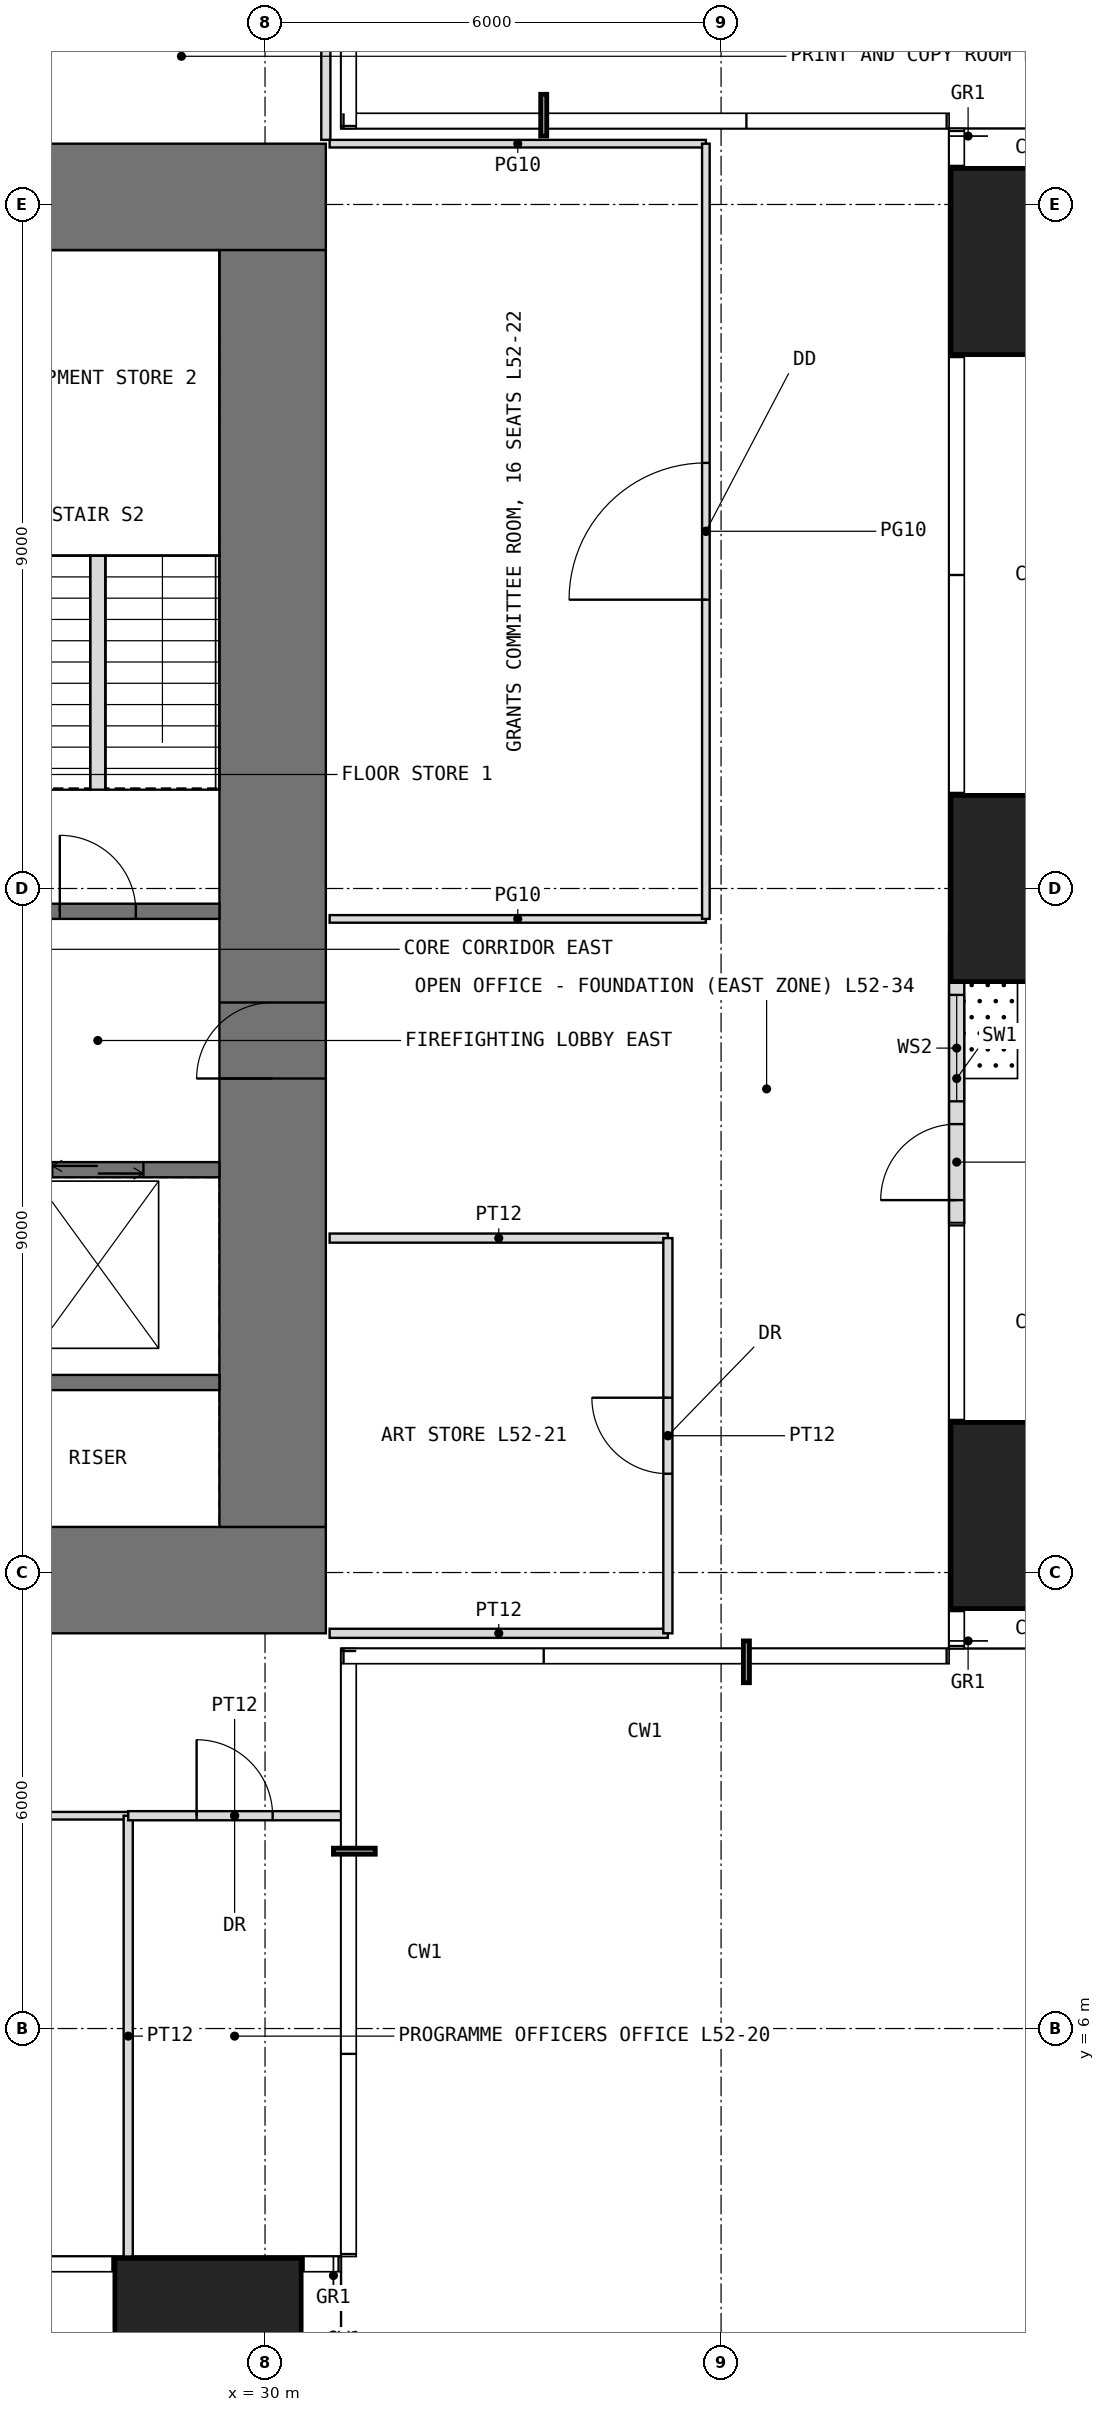
"""IFC4 building model, lengths in metres.
Left out: names, types, materials, properties, quantities, classifications, styles, units other than length and angle.
Written with IfcOpenShell. Run it as: python <this file> out.ifc"""

import sys

from ifc_helpers import new_model, si_unit, direction, frame, frame_2d, origin, origin_2d, place, context, subcontext, project, spatial, rectangle, extrude, element, fill, save


model = new_model("IFC4")
c1 = context("Model", 3, precision=1e-05, world=origin(), true_north=direction((0.0, 1.0)))
c2 = subcontext(c1, "Body", "Model", "MODEL_VIEW")
j1 = project(units=[si_unit("LENGTHUNIT", "METRE"), si_unit("PLANEANGLEUNIT", "RADIAN")], contexts=[c1])
p1 = place(None, origin())
s1 = spatial("IfcSite", under=j1, at=p1, CompositionType="ELEMENT")
p2 = place(p1, origin())
s2 = spatial("IfcBuilding", under=s1, at=p2, CompositionType="ELEMENT")
p3 = place(p2, frame((0.0, 0.0, 218.5)))
s3 = spatial("IfcBuildingStorey", under=s2, at=p3, CompositionType="ELEMENT", Elevation=218.5)
for number, where, z_axis, x_axis in (
    (1, (29.25, 1.75, 0.0), (0.0, 0.0, 1.0), (1.0, 0.0, 0.0)),
    (2, (40.25, 12.75, 0.0), (0.0, 0.0, 1.0), (1.0, 0.0, 0.0)),
    (3, (40.25, 21.0, 0.0), (0.0, 0.0, 1.0), (1.0, 0.0, 0.0)),
    (4, (40.25, 29.25, 0.0), (0.0, 0.0, 1.0), (1.0, 0.0, 0.0)),
):
    element("IfcColumn", number, at=place(p3, frame(where, z_axis=z_axis, x_axis=x_axis)), inside=s3, PredefinedType="COLUMN", context=c2, shape_type="SweptSolid", body=[
        extrude(rectangle(XDim=2.45, YDim=2.45, at=origin_2d()), origin(), (0.0, 0.0, 1.0), 4.0),
    ])
p4 = place(p3, frame((39.1, 16.6, 0.0), z_axis=(0.0, 0.0, 1.0), x_axis=(0.0, 1.0, 0.0)))
e5 = element("IfcWall", 5, at=p4, inside=s3, PredefinedType="USERDEFINED", context=c2, shape_type="SweptSolid", body=[
    extrude(rectangle(XDim=3.8, YDim=0.2, at=frame_2d((1.9, 0.0))), origin(), (0.0, 0.0, 1.0), 3.75),
])
p5 = place(p4, frame((0.3, 0.0, 0.0)))
e6 = element("IfcOpeningElement", 6, at=p5, cuts=e5, PredefinedType="OPENING", context=c2, shape_type="SweptSolid", body=[
    extrude(rectangle(XDim=1.0, YDim=2.4, at=frame_2d((0.5, 1.2))), frame((0.0, 0.11, 0.0), z_axis=(0.0, -1.0, 0.0), x_axis=(1.0, 0.0, 0.0)), (0.0, 0.0, 1.0), 0.22),
])
p6 = place(p4, frame((1.6, 0.0, 0.3)))
e7 = element("IfcOpeningElement", 7, at=p6, cuts=e5, PredefinedType="OPENING", context=c2, shape_type="SweptSolid", body=[
    extrude(rectangle(XDim=1.4, YDim=2.7, at=frame_2d((0.7, 1.35))), frame((0.0, 0.11, 0.0), z_axis=(0.0, -1.0, 0.0), x_axis=(1.0, 0.0, 0.0)), (0.0, 0.0, 1.0), 0.22),
])
p7 = place(p3, frame((11.2, 11.9, -0.05), z_axis=(0.0, 0.0, 1.0), x_axis=(1.0, 0.0, 0.0)))
e8 = element("IfcWall", 8, at=p7, inside=s3, PredefinedType="SHEAR", context=c2, shape_type="SweptSolid", body=[
    extrude(rectangle(XDim=19.6, YDim=1.4, at=frame_2d((9.8, 0.0))), origin(), (0.0, 0.0, 1.0), 4.0),
])
p8 = place(p7, frame((8.8, 0.0, 0.05)))
e9 = element("IfcOpeningElement", 9, at=p8, cuts=e8, PredefinedType="OPENING", context=c2, shape_type="SweptSolid", body=[
    extrude(rectangle(XDim=2.0, YDim=2.2, at=frame_2d((1.0, 1.1))), frame((0.0, 0.71, 0.0), z_axis=(0.0, -1.0, 0.0), x_axis=(1.0, 0.0, 0.0)), (0.0, 0.0, 1.0), 1.42),
])
p9 = place(p3, frame((11.2, 30.1, -0.05), z_axis=(0.0, 0.0, 1.0), x_axis=(1.0, 0.0, 0.0)))
e10 = element("IfcWall", 10, at=p9, inside=s3, PredefinedType="SHEAR", context=c2, shape_type="SweptSolid", body=[
    extrude(rectangle(XDim=19.6, YDim=1.4, at=frame_2d((9.8, 0.0))), origin(), (0.0, 0.0, 1.0), 4.0),
])
p10 = place(p9, frame((8.8, 0.0, 0.05)))
e11 = element("IfcOpeningElement", 11, at=p10, cuts=e10, PredefinedType="OPENING", context=c2, shape_type="SweptSolid", body=[
    extrude(rectangle(XDim=2.0, YDim=2.2, at=frame_2d((1.0, 1.1))), frame((0.0, 0.71, 0.0), z_axis=(0.0, -1.0, 0.0), x_axis=(1.0, 0.0, 0.0)), (0.0, 0.0, 1.0), 1.42),
])
p11 = place(p3, frame((30.1, 12.6, -0.05), z_axis=(0.0, 0.0, 1.0), x_axis=(0.0, 1.0, 0.0)))
e12 = element("IfcWall", 12, at=p11, inside=s3, PredefinedType="SHEAR", context=c2, shape_type="SweptSolid", body=[
    extrude(rectangle(XDim=16.8, YDim=1.4, at=frame_2d((8.4, 0.0))), origin(), (0.0, 0.0, 1.0), 4.0),
])
p12 = place(p11, frame((5.9, 0.0, 0.05)))
e13 = element("IfcOpeningElement", 13, at=p12, cuts=e12, PredefinedType="OPENING", context=c2, shape_type="SweptSolid", body=[
    extrude(rectangle(XDim=1.0, YDim=2.2, at=frame_2d((0.5, 1.1))), frame((0.0, 0.71, 0.0), z_axis=(0.0, -1.0, 0.0), x_axis=(1.0, 0.0, 0.0)), (0.0, 0.0, 1.0), 1.42),
])
p13 = place(p3, frame((26.2, 14.5, -0.05), z_axis=(0.0, 0.0, 1.0), x_axis=(1.0, 0.0, 0.0)))
e14 = element("IfcWall", 14, at=p13, inside=s3, PredefinedType="SHEAR", context=c2, shape_type="SweptSolid", body=[
    extrude(rectangle(XDim=3.2, YDim=0.2, at=frame_2d((1.6, 0.0))), origin(), (0.0, 0.0, 1.0), 4.0),
])
p14 = place(p3, frame((26.2, 17.3, -0.05), z_axis=(0.0, 0.0, 1.0), x_axis=(1.0, 0.0, 0.0)))
e15 = element("IfcWall", 15, at=p14, inside=s3, PredefinedType="SHEAR", context=c2, shape_type="SweptSolid", body=[
    extrude(rectangle(XDim=3.2, YDim=0.2, at=frame_2d((1.6, 0.0))), origin(), (0.0, 0.0, 1.0), 4.0),
])
p15 = place(p14, frame((1.0, 0.0, 0.05)))
e16 = element("IfcOpeningElement", 16, at=p15, cuts=e15, PredefinedType="OPENING", context=c2, shape_type="SweptSolid", body=[
    extrude(rectangle(XDim=1.2, YDim=2.2, at=frame_2d((0.6, 1.1))), frame((0.0, 0.11, 0.0), z_axis=(0.0, -1.0, 0.0), x_axis=(1.0, 0.0, 0.0)), (0.0, 0.0, 1.0), 0.22),
])
p16 = place(p3, frame((26.2, 20.7, -0.05), z_axis=(0.0, 0.0, 1.0), x_axis=(1.0, 0.0, 0.0)))
e17 = element("IfcWall", 17, at=p16, inside=s3, PredefinedType="SHEAR", context=c2, shape_type="SweptSolid", body=[
    extrude(rectangle(XDim=3.2, YDim=0.2, at=frame_2d((1.6, 0.0))), origin(), (0.0, 0.0, 1.0), 4.0),
])
p17 = place(p16, frame((1.1, 0.0, 0.05)))
e18 = element("IfcOpeningElement", 18, at=p17, cuts=e17, PredefinedType="OPENING", context=c2, shape_type="SweptSolid", body=[
    extrude(rectangle(XDim=1.0, YDim=2.2, at=frame_2d((0.5, 1.1))), frame((0.0, 0.11, 0.0), z_axis=(0.0, -1.0, 0.0), x_axis=(1.0, 0.0, 0.0)), (0.0, 0.0, 1.0), 0.22),
])
p18 = place(p3, frame((18.95, 8.8, 0.0), z_axis=(0.0, 0.0, 1.0), x_axis=(1.0, 0.0, 0.0)))
e19 = element("IfcWall", 19, at=p18, inside=s3, PredefinedType="PARTITIONING", context=c2, shape_type="SweptSolid", body=[
    extrude(rectangle(XDim=9.25, YDim=0.1, at=frame_2d((4.625, 0.0))), origin(), (0.0, 0.0, 1.0), 3.75),
])
p19 = place(p18, frame((4.125, 0.0, 0.0)))
e20 = element("IfcOpeningElement", 20, at=p19, cuts=e19, PredefinedType="OPENING", context=c2, shape_type="SweptSolid", body=[
    extrude(rectangle(XDim=1.0, YDim=2.4, at=frame_2d((0.5, 1.2))), frame((0.0, 0.06, 0.0), z_axis=(0.0, -1.0, 0.0), x_axis=(1.0, 0.0, 0.0)), (0.0, 0.0, 1.0), 0.12),
])
p20 = place(p3, frame((28.2, 3.0, 0.0), z_axis=(0.0, 0.0, 1.0), x_axis=(0.0, 1.0, 0.0)))
e21 = element("IfcWall", 21, at=p20, inside=s3, PredefinedType="PARTITIONING", context=c2, shape_type="SweptSolid", body=[
    extrude(rectangle(XDim=5.8, YDim=0.12, at=frame_2d((2.9, 0.0))), origin(), (0.0, 0.0, 1.0), 3.75),
])
p21 = place(p3, frame((28.2, 8.8, 0.0), z_axis=(0.0, 0.0, 1.0), x_axis=(1.0, 0.0, 0.0)))
e22 = element("IfcWall", 22, at=p21, inside=s3, PredefinedType="PARTITIONING", context=c2, shape_type="SweptSolid", body=[
    extrude(rectangle(XDim=2.8, YDim=0.12, at=frame_2d((1.4, 0.0))), origin(), (0.0, 0.0, 1.0), 3.75),
])
p22 = place(p21, frame((0.9, 0.0, 0.0)))
e23 = element("IfcOpeningElement", 23, at=p22, cuts=e22, PredefinedType="OPENING", context=c2, shape_type="SweptSolid", body=[
    extrude(rectangle(XDim=1.0, YDim=2.2, at=frame_2d((0.5, 1.1))), frame((0.0, 0.07, 0.0), z_axis=(0.0, -1.0, 0.0), x_axis=(1.0, 0.0, 0.0)), (0.0, 0.0, 1.0), 0.14),
])
p23 = place(p3, frame((30.8, 30.85, 0.0), z_axis=(0.0, 0.0, 1.0), x_axis=(0.0, 1.0, 0.0)))
e24 = element("IfcWall", 24, at=p23, inside=s3, PredefinedType="PARTITIONING", context=c2, shape_type="SweptSolid", body=[
    extrude(rectangle(XDim=2.25, YDim=0.12, at=frame_2d((1.125, 0.0))), origin(), (0.0, 0.0, 1.0), 3.75),
])
for number, where, z_axis, x_axis in (
    (25, (30.85, 11.2, 0.0), (0.0, 0.0, 1.0), (1.0, 0.0, 0.0)),
    (26, (30.85, 16.4, 0.0), (0.0, 0.0, 1.0), (1.0, 0.0, 0.0)),
):
    element("IfcWall", number, at=place(p3, frame(where, z_axis=z_axis, x_axis=x_axis)), inside=s3, PredefinedType="PARTITIONING", context=c2, shape_type="SweptSolid", body=[
        extrude(rectangle(XDim=4.45, YDim=0.12, at=frame_2d((2.225, 0.0))), origin(), (0.0, 0.0, 1.0), 3.75),
    ])
for number, where, z_axis, x_axis in (
    (27, (30.85, 20.6, 0.0), (0.0, 0.0, 1.0), (1.0, 0.0, 0.0)),
    (28, (30.85, 30.8, 0.0), (0.0, 0.0, 1.0), (1.0, 0.0, 0.0)),
):
    element("IfcWall", number, at=place(p3, frame(where, z_axis=z_axis, x_axis=x_axis)), inside=s3, PredefinedType="PARTITIONING", context=c2, shape_type="SweptSolid", body=[
        extrude(rectangle(XDim=4.95, YDim=0.1, at=frame_2d((2.475, 0.0))), origin(), (0.0, 0.0, 1.0), 3.75),
    ])
p24 = place(p3, frame((35.3, 11.2, 0.0), z_axis=(0.0, 0.0, 1.0), x_axis=(0.0, 1.0, 0.0)))
e29 = element("IfcWall", 29, at=p24, inside=s3, PredefinedType="PARTITIONING", context=c2, shape_type="SweptSolid", body=[
    extrude(rectangle(XDim=5.2, YDim=0.12, at=frame_2d((2.6, 0.0))), origin(), (0.0, 0.0, 1.0), 3.75),
])
p25 = place(p24, frame((2.1, 0.0, 0.0)))
e30 = element("IfcOpeningElement", 30, at=p25, cuts=e29, PredefinedType="OPENING", context=c2, shape_type="SweptSolid", body=[
    extrude(rectangle(XDim=1.0, YDim=2.2, at=frame_2d((0.5, 1.1))), frame((0.0, 0.07, 0.0), z_axis=(0.0, -1.0, 0.0), x_axis=(1.0, 0.0, 0.0)), (0.0, 0.0, 1.0), 0.14),
])
p26 = place(p3, frame((35.8, 20.6, 0.0), z_axis=(0.0, 0.0, 1.0), x_axis=(0.0, 1.0, 0.0)))
e31 = element("IfcWall", 31, at=p26, inside=s3, PredefinedType="PARTITIONING", context=c2, shape_type="SweptSolid", body=[
    extrude(rectangle(XDim=10.2, YDim=0.1, at=frame_2d((5.1, 0.0))), origin(), (0.0, 0.0, 1.0), 3.75),
])
p27 = place(p26, frame((4.2, 0.0, 0.0)))
e32 = element("IfcOpeningElement", 32, at=p27, cuts=e31, PredefinedType="OPENING", context=c2, shape_type="SweptSolid", body=[
    extrude(rectangle(XDim=1.8, YDim=2.4, at=frame_2d((0.9, 1.2))), frame((0.0, 0.06, 0.0), z_axis=(0.0, -1.0, 0.0), x_axis=(1.0, 0.0, 0.0)), (0.0, 0.0, 1.0), 0.12),
])
p28 = place(p3, frame((27.8, 22.3, 0.0), z_axis=(0.0, 0.0, 1.0), x_axis=(0.0, 1.0, 0.0)))
e33 = element("IfcWall", 33, at=p28, inside=s3, PredefinedType="PARTITIONING", context=c2, shape_type="SweptSolid", body=[
    extrude(rectangle(XDim=3.08, YDim=0.2, at=frame_2d((1.54, 0.0))), origin(), (0.0, 0.0, 1.0), 4.0),
])
p29 = place(p5, origin())
e34 = element("IfcDoor", 34, at=p29, inside=s3, OperationType="SINGLE_SWING_LEFT", PredefinedType="DOOR", context=c2, shape_type="SweptSolid", body=[
    extrude(rectangle(XDim=1.0, YDim=2.4, at=frame_2d((0.5, 1.2))), frame((0.0, 0.025, 0.0), z_axis=(0.0, -1.0, 0.0), x_axis=(1.0, 0.0, 0.0)), (0.0, 0.0, 1.0), 0.05),
])
fill(e6, e34)
p30 = place(p6, origin())
e35 = element("IfcWindow", 35, at=p30, inside=s3, PartitioningType="SINGLE_PANEL", PredefinedType="WINDOW", context=c2, shape_type="SweptSolid", body=[
    extrude(rectangle(XDim=1.4, YDim=2.7, at=frame_2d((0.7, 1.35))), frame((0.0, 0.03, 0.0), z_axis=(0.0, -1.0, 0.0), x_axis=(1.0, 0.0, 0.0)), (0.0, 0.0, 1.0), 0.06),
])
fill(e7, e35)
p31 = place(p12, origin())
e36 = element("IfcDoor", 36, at=p31, inside=s3, OperationType="SINGLE_SWING_LEFT", PredefinedType="DOOR", context=c2, shape_type="SweptSolid", body=[
    extrude(rectangle(XDim=1.0, YDim=2.2, at=frame_2d((0.5, 1.1))), frame((0.0, 0.025, 0.0), z_axis=(0.0, -1.0, 0.0), x_axis=(1.0, 0.0, 0.0)), (0.0, 0.0, 1.0), 0.05),
])
fill(e13, e36)
p32 = place(p17, origin())
e37 = element("IfcDoor", 37, at=p32, inside=s3, OperationType="SINGLE_SWING_LEFT", PredefinedType="DOOR", context=c2, shape_type="SweptSolid", body=[
    extrude(rectangle(XDim=1.0, YDim=2.2, at=frame_2d((0.5, 1.1))), frame((0.0, 0.025, 0.0), z_axis=(0.0, -1.0, 0.0), x_axis=(1.0, 0.0, 0.0)), (0.0, 0.0, 1.0), 0.05),
])
fill(e18, e37)
p33 = place(p22, origin())
e38 = element("IfcDoor", 38, at=p33, inside=s3, OperationType="SINGLE_SWING_LEFT", PredefinedType="DOOR", context=c2, shape_type="SweptSolid", body=[
    extrude(rectangle(XDim=1.0, YDim=2.2, at=frame_2d((0.5, 1.1))), frame((0.0, 0.025, 0.0), z_axis=(0.0, -1.0, 0.0), x_axis=(1.0, 0.0, 0.0)), (0.0, 0.0, 1.0), 0.05),
])
fill(e23, e38)
p34 = place(p25, origin())
e39 = element("IfcDoor", 39, at=p34, inside=s3, OperationType="SINGLE_SWING_RIGHT", PredefinedType="DOOR", context=c2, shape_type="SweptSolid", body=[
    extrude(rectangle(XDim=1.0, YDim=2.2, at=frame_2d((0.5, 1.1))), frame((0.0, 0.025, 0.0), z_axis=(0.0, -1.0, 0.0), x_axis=(1.0, 0.0, 0.0)), (0.0, 0.0, 1.0), 0.05),
])
fill(e30, e39)
p35 = place(p27, origin())
e40 = element("IfcDoor", 40, at=p35, inside=s3, OperationType="DOUBLE_DOOR_SINGLE_SWING", PredefinedType="DOOR", context=c2, shape_type="SweptSolid", body=[
    extrude(rectangle(XDim=1.8, YDim=2.4, at=frame_2d((0.9, 1.2))), frame((0.0, 0.025, 0.0), z_axis=(0.0, -1.0, 0.0), x_axis=(1.0, 0.0, 0.0)), (0.0, 0.0, 1.0), 0.05),
])
fill(e32, e40)
p36 = place(p15, origin())
e41 = element("IfcDoor", 41, at=p36, inside=s3, OperationType="DOUBLE_DOOR_SLIDING", PredefinedType="DOOR", context=c2, shape_type="SweptSolid", body=[
    extrude(rectangle(XDim=1.2, YDim=2.2, at=frame_2d((0.6, 1.1))), frame((0.0, 0.025, 0.0), z_axis=(0.0, -1.0, 0.0), x_axis=(1.0, 0.0, 0.0)), (0.0, 0.0, 1.0), 0.05),
])
fill(e16, e41)
save(model, sys.argv[1])
